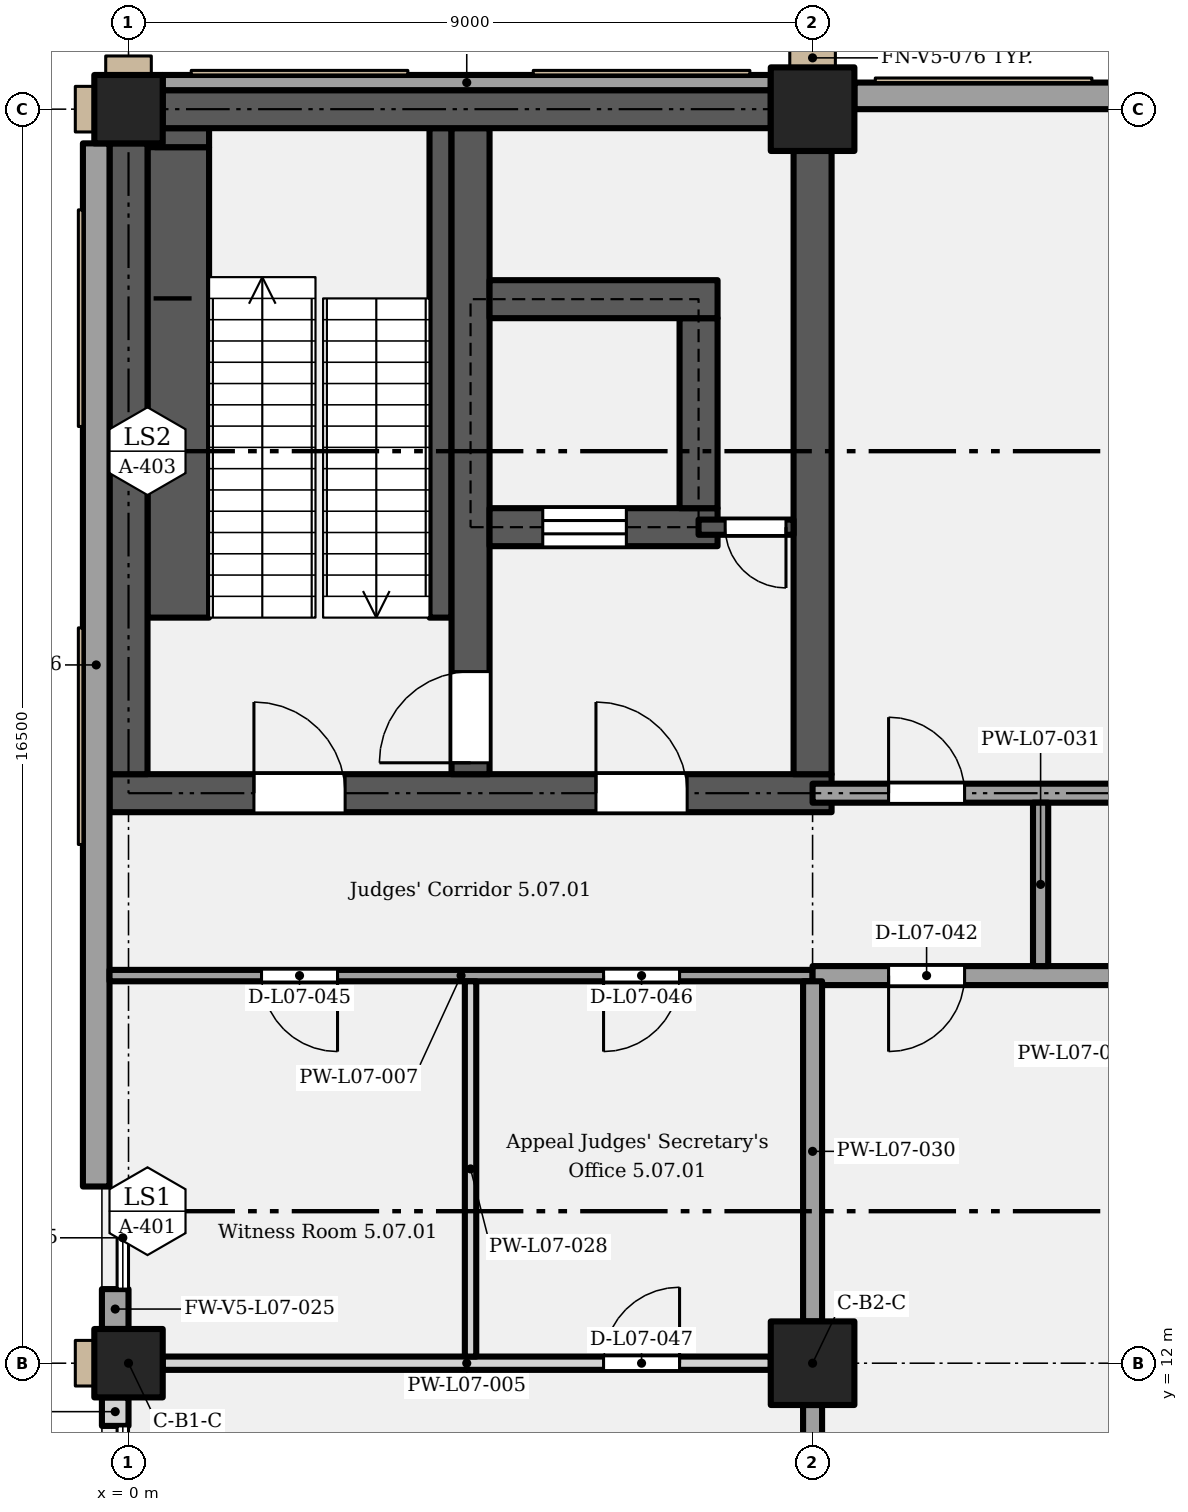
"""IFC4 building model, lengths in metres.
Left out: names, types, materials, properties, quantities, classifications, styles, units other than length and angle.
Written with IfcOpenShell. Run it as: python <this file> out.ifc"""

import sys

from ifc_helpers import new_model, si_unit, direction, frame, frame_2d, origin, origin_2d, place, context, subcontext, project, spatial, rectangle, extrude, element, fill, save


model = new_model("IFC4")
c1 = context("Model", 3, precision=1e-05, world=origin(), true_north=direction((0.0, 1.0)))
c2 = subcontext(c1, "Body", "Model", "MODEL_VIEW")
j1 = project(units=[si_unit("LENGTHUNIT", "METRE"), si_unit("PLANEANGLEUNIT", "RADIAN")], contexts=[c1])
p1 = place(None, origin())
s1 = spatial("IfcSite", under=j1, at=p1, CompositionType="ELEMENT")
p2 = place(p1, origin())
s2 = spatial("IfcBuilding", under=s1, at=p2, CompositionType="ELEMENT")
p3 = place(p2, frame((0.0, 0.0, 39.0)))
s3 = spatial("IfcBuildingStorey", under=s2, at=p3, CompositionType="ELEMENT", Elevation=39.0)
p4 = place(p3, frame((0.0, 12.0, 0.0), z_axis=(0.0, 0.0, 1.0), x_axis=(1.0, 0.0, 0.0)))
e1 = element("IfcColumn", 1, at=p4, inside=s3, PredefinedType="COLUMN", context=c2, shape_type="SweptSolid", body=[
    extrude(rectangle(XDim=0.9, YDim=0.9, at=origin_2d()), origin(), (0.0, 0.0, 1.0), 5.4),
])
p5 = place(p3, frame((9.0, 12.0, 0.0), z_axis=(0.0, 0.0, 1.0), x_axis=(1.0, 0.0, 0.0)))
e2 = element("IfcColumn", 2, at=p5, inside=s3, PredefinedType="COLUMN", context=c2, shape_type="SweptSolid", body=[
    extrude(rectangle(XDim=1.1, YDim=1.1, at=origin_2d()), origin(), (0.0, 0.0, 1.0), 5.4),
])
p6 = place(p3, frame((0.0, 28.5, 0.0), z_axis=(0.0, 0.0, 1.0), x_axis=(1.0, 0.0, 0.0)))
e3 = element("IfcColumn", 3, at=p6, inside=s3, PredefinedType="COLUMN", context=c2, shape_type="SweptSolid", body=[
    extrude(rectangle(XDim=0.9, YDim=0.9, at=origin_2d()), origin(), (0.0, 0.0, 1.0), 5.4),
])
p7 = place(p3, frame((9.0, 28.5, 0.0), z_axis=(0.0, 0.0, 1.0), x_axis=(1.0, 0.0, 0.0)))
e4 = element("IfcColumn", 4, at=p7, inside=s3, PredefinedType="COLUMN", context=c2, shape_type="SweptSolid", body=[
    extrude(rectangle(XDim=1.1, YDim=1.1, at=origin_2d()), origin(), (0.0, 0.0, 1.0), 5.4),
])
p8 = place(p3, frame((-0.25, 19.5, 0.0), z_axis=(0.0, 0.0, 1.0), x_axis=(1.0, 0.0, 0.0)))
e5 = element("IfcWall", 5, at=p8, inside=s3, PredefinedType="SHEAR", context=c2, shape_type="SweptSolid", body=[
    extrude(rectangle(XDim=9.5, YDim=0.5, at=frame_2d((4.75, 0.0))), origin(), (0.0, 0.0, 1.0), 5.15),
])
p9 = place(p8, frame((1.9, 0.0, 0.0)))
e6 = element("IfcOpeningElement", 6, at=p9, cuts=e5, PredefinedType="OPENING", context=c2, shape_type="SweptSolid", body=[
    extrude(rectangle(XDim=1.2, YDim=2.1, at=frame_2d((0.6, 1.05))), frame((0.0, 0.26, 0.0), z_axis=(0.0, -1.0, 0.0), x_axis=(1.0, 0.0, 0.0)), (0.0, 0.0, 1.0), 0.52),
])
p10 = place(p8, frame((6.4, 0.0, 0.0)))
e7 = element("IfcOpeningElement", 7, at=p10, cuts=e5, PredefinedType="OPENING", context=c2, shape_type="SweptSolid", body=[
    extrude(rectangle(XDim=1.2, YDim=2.1, at=frame_2d((0.6, 1.05))), frame((0.0, 0.26, 0.0), z_axis=(0.0, -1.0, 0.0), x_axis=(1.0, 0.0, 0.0)), (0.0, 0.0, 1.0), 0.52),
])
p11 = place(p3, frame((0.0, 19.75, 0.0), z_axis=(0.0, 0.0, 1.0), x_axis=(0.0, 1.0, 0.0)))
e8 = element("IfcWall", 8, at=p11, inside=s3, PredefinedType="SHEAR", context=c2, shape_type="SweptSolid", body=[
    extrude(rectangle(XDim=8.3, YDim=0.5, at=frame_2d((4.15, 0.0))), origin(), (0.0, 0.0, 1.0), 5.15),
])
p12 = place(p3, frame((4.5, 19.75, 0.0), z_axis=(0.0, 0.0, 1.0), x_axis=(0.0, 1.0, 0.0)))
e9 = element("IfcWall", 9, at=p12, inside=s3, PredefinedType="SHEAR", context=c2, shape_type="SweptSolid", body=[
    extrude(rectangle(XDim=8.5, YDim=0.5, at=frame_2d((4.25, 0.0))), origin(), (0.0, 0.0, 1.0), 5.15),
])
p13 = place(p12, frame((0.15, 0.0, 0.0)))
e10 = element("IfcOpeningElement", 10, at=p13, cuts=e9, PredefinedType="OPENING", context=c2, shape_type="SweptSolid", body=[
    extrude(rectangle(XDim=1.2, YDim=2.1, at=frame_2d((0.6, 1.05))), frame((0.0, 0.26, 0.0), z_axis=(0.0, -1.0, 0.0), x_axis=(1.0, 0.0, 0.0)), (0.0, 0.0, 1.0), 0.52),
])
p14 = place(p3, frame((9.0, 19.75, 0.0), z_axis=(0.0, 0.0, 1.0), x_axis=(0.0, 1.0, 0.0)))
e11 = element("IfcWall", 11, at=p14, inside=s3, PredefinedType="SHEAR", context=c2, shape_type="SweptSolid", body=[
    extrude(rectangle(XDim=8.2, YDim=0.5, at=frame_2d((4.1, 0.0))), origin(), (0.0, 0.0, 1.0), 5.15),
])
p15 = place(p3, frame((4.75, 23.0, 0.0), z_axis=(0.0, 0.0, 1.0), x_axis=(1.0, 0.0, 0.0)))
e12 = element("IfcWall", 12, at=p15, inside=s3, PredefinedType="SHEAR", context=c2, shape_type="SweptSolid", body=[
    extrude(rectangle(XDim=3.0, YDim=0.5, at=frame_2d((1.5, 0.0))), origin(), (0.0, 0.0, 1.0), 5.15),
])
p16 = place(p15, frame((0.7, 0.0, 0.0)))
e13 = element("IfcOpeningElement", 13, at=p16, cuts=e12, PredefinedType="OPENING", context=c2, shape_type="SweptSolid", body=[
    extrude(rectangle(XDim=1.1, YDim=2.1, at=frame_2d((0.55, 1.05))), frame((0.0, 0.26, 0.0), z_axis=(0.0, -1.0, 0.0), x_axis=(1.0, 0.0, 0.0)), (0.0, 0.0, 1.0), 0.52),
])
p17 = place(p3, frame((7.5, 23.25, 0.0), z_axis=(0.0, 0.0, 1.0), x_axis=(0.0, 1.0, 0.0)))
e14 = element("IfcWall", 14, at=p17, inside=s3, PredefinedType="SHEAR", context=c2, shape_type="SweptSolid", body=[
    extrude(rectangle(XDim=2.5, YDim=0.5, at=frame_2d((1.25, 0.0))), origin(), (0.0, 0.0, 1.0), 5.15),
])
p18 = place(p3, frame((4.75, 26.0, 0.0), z_axis=(0.0, 0.0, 1.0), x_axis=(1.0, 0.0, 0.0)))
e15 = element("IfcWall", 15, at=p18, inside=s3, PredefinedType="SHEAR", context=c2, shape_type="SweptSolid", body=[
    extrude(rectangle(XDim=3.0, YDim=0.5, at=frame_2d((1.5, 0.0))), origin(), (0.0, 0.0, 1.0), 5.15),
])
p19 = place(p3, frame((0.45, 28.5, 0.0), z_axis=(0.0, 0.0, 1.0), x_axis=(1.0, 0.0, 0.0)))
e16 = element("IfcWall", 16, at=p19, inside=s3, PredefinedType="SHEAR", context=c2, shape_type="SweptSolid", body=[
    extrude(rectangle(XDim=8.0, YDim=0.5, at=frame_2d((4.0, 0.0))), origin(), (0.0, 0.0, 1.0), 5.15),
])
p20 = place(p3, frame((0.45, 28.85, 0.0), z_axis=(0.0, 0.0, 1.0), x_axis=(1.0, 0.0, 0.0)))
e17 = element("IfcWall", 17, at=p20, inside=s3, PredefinedType="SOLIDWALL", context=c2, shape_type="SweptSolid", body=[
    extrude(rectangle(XDim=8.0, YDim=0.2, at=frame_2d((4.0, 0.0))), origin(), (0.0, 0.0, 1.0), 5.15),
])
p21 = place(p3, frame((9.55, 28.675, 0.0), z_axis=(0.0, 0.0, 1.0), x_axis=(1.0, 0.0, 0.0)))
e18 = element("IfcWall", 18, at=p21, inside=s3, PredefinedType="SOLIDWALL", context=c2, shape_type="SweptSolid", body=[
    extrude(rectangle(XDim=7.9, YDim=0.35, at=frame_2d((3.95, 0.0))), origin(), (0.0, 0.0, 1.0), 5.15),
])
p22 = place(p3, frame((-0.175, 11.175, 0.0), z_axis=(0.0, 0.0, 1.0), x_axis=(0.0, 1.0, 0.0)))
e19 = element("IfcWall", 19, at=p22, inside=s3, PredefinedType="SOLIDWALL", context=c2, shape_type="SweptSolid", body=[
    extrude(rectangle(XDim=0.375, YDim=0.35, at=frame_2d((0.188, 0.0))), origin(), (0.0, 0.0, 1.0), 5.15),
])
p23 = place(p3, frame((-0.175, 12.45, 0.0), z_axis=(0.0, 0.0, 1.0), x_axis=(0.0, 1.0, 0.0)))
e20 = element("IfcWall", 20, at=p23, inside=s3, PredefinedType="SOLIDWALL", context=c2, shape_type="SweptSolid", body=[
    extrude(rectangle(XDim=0.525, YDim=0.35, at=frame_2d((0.263, 0.0))), origin(), (0.0, 0.0, 1.0), 5.15),
])
p24 = place(p3, frame((-0.425, 14.325, 0.0), z_axis=(0.0, 0.0, 1.0), x_axis=(0.0, 1.0, 0.0)))
e21 = element("IfcWall", 21, at=p24, inside=s3, PredefinedType="SOLIDWALL", context=c2, shape_type="SweptSolid", body=[
    extrude(rectangle(XDim=13.725, YDim=0.35, at=frame_2d((6.863, 0.0))), origin(), (0.0, 0.0, 1.0), 5.15),
])
p25 = place(p3, frame((0.45, 12.0, 0.0), z_axis=(0.0, 0.0, 1.0), x_axis=(1.0, 0.0, 0.0)))
e22 = element("IfcWall", 22, at=p25, inside=s3, PredefinedType="PARTITIONING", context=c2, shape_type="SweptSolid", body=[
    extrude(rectangle(XDim=8.0, YDim=0.175, at=frame_2d((4.0, 0.0))), origin(), (0.0, 0.0, 1.0), 4.4),
])
p26 = place(p25, frame((5.8, 0.0, 0.0)))
e23 = element("IfcOpeningElement", 23, at=p26, cuts=e22, PredefinedType="OPENING", context=c2, shape_type="SweptSolid", body=[
    extrude(rectangle(XDim=1.0, YDim=2.1, at=frame_2d((0.5, 1.05))), frame((0.0, 0.097, 0.0), z_axis=(0.0, -1.0, 0.0), x_axis=(1.0, 0.0, 0.0)), (0.0, 0.0, 1.0), 0.195),
])
p27 = place(p3, frame((-0.25, 17.1, 0.0), z_axis=(0.0, 0.0, 1.0), x_axis=(1.0, 0.0, 0.0)))
e24 = element("IfcWall", 24, at=p27, inside=s3, PredefinedType="PARTITIONING", context=c2, shape_type="SweptSolid", body=[
    extrude(rectangle(XDim=9.25, YDim=0.15, at=frame_2d((4.625, 0.0))), origin(), (0.0, 0.0, 1.0), 5.15),
])
p28 = place(p27, frame((3.0, 0.0, 0.0), z_axis=(0.0, 0.0, 1.0), x_axis=(-1.0, 0.0, 0.0)))
e25 = element("IfcOpeningElement", 25, at=p28, cuts=e24, PredefinedType="OPENING", context=c2, shape_type="SweptSolid", body=[
    extrude(rectangle(XDim=1.0, YDim=2.1, at=frame_2d((0.5, 1.05))), frame((0.0, 0.085, 0.0), z_axis=(0.0, -1.0, 0.0), x_axis=(1.0, 0.0, 0.0)), (0.0, 0.0, 1.0), 0.17),
])
p29 = place(p27, frame((7.5, 0.0, 0.0), z_axis=(0.0, 0.0, 1.0), x_axis=(-1.0, 0.0, 0.0)))
e26 = element("IfcOpeningElement", 26, at=p29, cuts=e24, PredefinedType="OPENING", context=c2, shape_type="SweptSolid", body=[
    extrude(rectangle(XDim=1.0, YDim=2.1, at=frame_2d((0.5, 1.05))), frame((0.0, 0.085, 0.0), z_axis=(0.0, -1.0, 0.0), x_axis=(1.0, 0.0, 0.0)), (0.0, 0.0, 1.0), 0.17),
])
p30 = place(p3, frame((9.0, 17.1, 0.0), z_axis=(0.0, 0.0, 1.0), x_axis=(1.0, 0.0, 0.0)))
e27 = element("IfcWall", 27, at=p30, inside=s3, PredefinedType="PARTITIONING", context=c2, shape_type="SweptSolid", body=[
    extrude(rectangle(XDim=9.0, YDim=0.25, at=frame_2d((4.5, 0.0))), origin(), (0.0, 0.0, 1.0), 5.15),
])
p31 = place(p30, frame((6.9, 0.0, 0.0), z_axis=(0.0, 0.0, 1.0), x_axis=(-1.0, 0.0, 0.0)))
e28 = element("IfcOpeningElement", 28, at=p31, cuts=e27, PredefinedType="OPENING", context=c2, shape_type="SweptSolid", body=[
    extrude(rectangle(XDim=1.8, YDim=2.4, at=frame_2d((0.9, 1.2))), frame((0.0, 0.135, 0.0), z_axis=(0.0, -1.0, 0.0), x_axis=(1.0, 0.0, 0.0)), (0.0, 0.0, 1.0), 0.27),
])
p32 = place(p30, frame((2.0, 0.0, 0.0), z_axis=(0.0, 0.0, 1.0), x_axis=(-1.0, 0.0, 0.0)))
e29 = element("IfcOpeningElement", 29, at=p32, cuts=e27, PredefinedType="OPENING", context=c2, shape_type="SweptSolid", body=[
    extrude(rectangle(XDim=1.0, YDim=2.1, at=frame_2d((0.5, 1.05))), frame((0.0, 0.135, 0.0), z_axis=(0.0, -1.0, 0.0), x_axis=(1.0, 0.0, 0.0)), (0.0, 0.0, 1.0), 0.27),
])
p33 = place(p3, frame((9.0, 19.5, 0.0), z_axis=(0.0, 0.0, 1.0), x_axis=(1.0, 0.0, 0.0)))
e30 = element("IfcWall", 30, at=p33, inside=s3, PredefinedType="PARTITIONING", context=c2, shape_type="SweptSolid", body=[
    extrude(rectangle(XDim=9.0, YDim=0.25, at=frame_2d((4.5, 0.0))), origin(), (0.0, 0.0, 1.0), 5.15),
])
p34 = place(p33, frame((5.1, 0.0, 0.0)))
e31 = element("IfcOpeningElement", 31, at=p34, cuts=e30, PredefinedType="OPENING", context=c2, shape_type="SweptSolid", body=[
    extrude(rectangle(XDim=1.8, YDim=2.4, at=frame_2d((0.9, 1.2))), frame((0.0, 0.135, 0.0), z_axis=(0.0, -1.0, 0.0), x_axis=(1.0, 0.0, 0.0)), (0.0, 0.0, 1.0), 0.27),
])
p35 = place(p33, frame((1.0, 0.0, 0.0)))
e32 = element("IfcOpeningElement", 32, at=p35, cuts=e30, PredefinedType="OPENING", context=c2, shape_type="SweptSolid", body=[
    extrude(rectangle(XDim=1.0, YDim=2.1, at=frame_2d((0.5, 1.05))), frame((0.0, 0.135, 0.0), z_axis=(0.0, -1.0, 0.0), x_axis=(1.0, 0.0, 0.0)), (0.0, 0.0, 1.0), 0.27),
])
p36 = place(p3, frame((7.5, 23.0, 0.0), z_axis=(0.0, 0.0, 1.0), x_axis=(1.0, 0.0, 0.0)))
e33 = element("IfcWall", 33, at=p36, inside=s3, PredefinedType="SHEAR", context=c2, shape_type="SweptSolid", body=[
    extrude(rectangle(XDim=1.25, YDim=0.2, at=frame_2d((0.625, 0.0))), origin(), (0.0, 0.0, 1.0), 5.15),
])
p37 = place(p36, frame((1.15, 0.0, 0.0), z_axis=(0.0, 0.0, 1.0), x_axis=(-1.0, 0.0, 0.0)))
e34 = element("IfcOpeningElement", 34, at=p37, cuts=e33, PredefinedType="OPENING", context=c2, shape_type="SweptSolid", body=[
    extrude(rectangle(XDim=0.8, YDim=2.0, at=frame_2d((0.4, 1.0))), frame((0.0, 0.11, 0.0), z_axis=(0.0, -1.0, 0.0), x_axis=(1.0, 0.0, 0.0)), (0.0, 0.0, 1.0), 0.22),
])
p38 = place(p3, frame((4.5, 12.087, 0.0), z_axis=(0.0, 0.0, 1.0), x_axis=(0.0, 1.0, 0.0)))
e35 = element("IfcWall", 35, at=p38, inside=s3, PredefinedType="PARTITIONING", context=c2, shape_type="SweptSolid", body=[
    extrude(rectangle(XDim=4.938, YDim=0.15, at=frame_2d((2.469, 0.0))), origin(), (0.0, 0.0, 1.0), 5.15),
])
p39 = place(p3, frame((9.0, 0.55, 0.0), z_axis=(0.0, 0.0, 1.0), x_axis=(0.0, 1.0, 0.0)))
e36 = element("IfcWall", 36, at=p39, inside=s3, PredefinedType="PARTITIONING", context=c2, shape_type="SweptSolid", body=[
    extrude(rectangle(XDim=10.9, YDim=0.25, at=frame_2d((5.45, 0.0))), origin(), (0.0, 0.0, 1.0), 4.4),
])
p40 = place(p39, frame((5.95, 0.0, 0.0), z_axis=(0.0, 0.0, 1.0), x_axis=(-1.0, 0.0, 0.0)))
e37 = element("IfcOpeningElement", 37, at=p40, cuts=e36, PredefinedType="OPENING", context=c2, shape_type="SweptSolid", body=[
    extrude(rectangle(XDim=1.0, YDim=2.1, at=frame_2d((0.5, 1.05))), frame((0.0, 0.135, 0.0), z_axis=(0.0, -1.0, 0.0), x_axis=(1.0, 0.0, 0.0)), (0.0, 0.0, 1.0), 0.27),
])
p41 = place(p3, frame((9.0, 12.55, 0.0), z_axis=(0.0, 0.0, 1.0), x_axis=(0.0, 1.0, 0.0)))
e38 = element("IfcWall", 38, at=p41, inside=s3, PredefinedType="PARTITIONING", context=c2, shape_type="SweptSolid", body=[
    extrude(rectangle(XDim=4.475, YDim=0.25, at=frame_2d((2.237, 0.0))), origin(), (0.0, 0.0, 1.0), 4.2),
])
p42 = place(p3, frame((12.0, 17.225, 0.0), z_axis=(0.0, 0.0, 1.0), x_axis=(0.0, 1.0, 0.0)))
e39 = element("IfcWall", 39, at=p42, inside=s3, PredefinedType="PARTITIONING", context=c2, shape_type="SweptSolid", body=[
    extrude(rectangle(XDim=2.15, YDim=0.2, at=frame_2d((1.075, 0.0))), origin(), (0.0, 0.0, 1.0), 5.15),
])
p43 = place(p3, frame((0.655, 21.81, 0.0), z_axis=(0.0, 0.0, 1.0), x_axis=(0.0, 1.0, 0.0)))
e40 = element("IfcWall", 40, at=p43, inside=s3, PredefinedType="SHEAR", context=c2, shape_type="SweptSolid", body=[
    extrude(rectangle(XDim=6.19, YDim=0.81, at=frame_2d((3.095, 0.0))), origin(), (0.0, 0.0, 1.0), 2.587),
])
p44 = place(p3, frame((0.705, 28.0, 0.0), z_axis=(0.0, 0.0, 1.0), x_axis=(0.0, 1.0, 0.0)))
e41 = element("IfcWall", 41, at=p44, inside=s3, PredefinedType="SHEAR", context=c2, shape_type="SweptSolid", body=[
    extrude(rectangle(XDim=0.25, YDim=0.71, at=frame_2d((0.125, 0.0))), origin(), (0.0, 0.0, 1.0), 2.587),
])
p45 = place(p3, frame((4.105, 21.81, 0.0), z_axis=(0.0, 0.0, 1.0), x_axis=(0.0, 1.0, 0.0)))
e42 = element("IfcWall", 42, at=p45, inside=s3, PredefinedType="SHEAR", context=c2, shape_type="SweptSolid", body=[
    extrude(rectangle(XDim=6.44, YDim=0.29, at=frame_2d((3.22, 0.0))), origin(), (0.0, 0.0, 1.0), 2.587),
])
p46 = place(p9, origin())
e43 = element("IfcDoor", 43, at=p46, inside=s3, OperationType="SINGLE_SWING_LEFT", PredefinedType="DOOR", context=c2, shape_type="SweptSolid", body=[
    extrude(rectangle(XDim=1.2, YDim=2.1, at=frame_2d((0.6, 1.05))), frame((0.0, 0.025, 0.0), z_axis=(0.0, -1.0, 0.0), x_axis=(1.0, 0.0, 0.0)), (0.0, 0.0, 1.0), 0.05),
])
fill(e6, e43)
p47 = place(p13, origin())
e44 = element("IfcDoor", 44, at=p47, inside=s3, OperationType="SINGLE_SWING_LEFT", PredefinedType="DOOR", context=c2, shape_type="SweptSolid", body=[
    extrude(rectangle(XDim=1.2, YDim=2.1, at=frame_2d((0.6, 1.05))), frame((0.0, 0.025, 0.0), z_axis=(0.0, -1.0, 0.0), x_axis=(1.0, 0.0, 0.0)), (0.0, 0.0, 1.0), 0.05),
])
fill(e10, e44)
p48 = place(p10, origin())
e45 = element("IfcDoor", 45, at=p48, inside=s3, OperationType="SINGLE_SWING_LEFT", PredefinedType="DOOR", context=c2, shape_type="SweptSolid", body=[
    extrude(rectangle(XDim=1.2, YDim=2.1, at=frame_2d((0.6, 1.05))), frame((0.0, 0.025, 0.0), z_axis=(0.0, -1.0, 0.0), x_axis=(1.0, 0.0, 0.0)), (0.0, 0.0, 1.0), 0.05),
])
fill(e7, e45)
p49 = place(p16, origin())
e46 = element("IfcDoor", 46, at=p49, inside=s3, OperationType="SLIDING_TO_LEFT", PredefinedType="DOOR", context=c2, shape_type="SweptSolid", body=[
    extrude(rectangle(XDim=1.1, YDim=2.1, at=frame_2d((0.55, 1.05))), frame((0.0, 0.025, 0.0), z_axis=(0.0, -1.0, 0.0), x_axis=(1.0, 0.0, 0.0)), (0.0, 0.0, 1.0), 0.05),
])
fill(e13, e46)
p50 = place(p37, origin())
e47 = element("IfcDoor", 47, at=p50, inside=s3, OperationType="SINGLE_SWING_LEFT", PredefinedType="DOOR", context=c2, shape_type="SweptSolid", body=[
    extrude(rectangle(XDim=0.8, YDim=2.0, at=frame_2d((0.4, 1.0))), frame((0.0, 0.025, 0.0), z_axis=(0.0, -1.0, 0.0), x_axis=(1.0, 0.0, 0.0)), (0.0, 0.0, 1.0), 0.05),
])
fill(e34, e47)
p51 = place(p32, origin())
e48 = element("IfcDoor", 48, at=p51, inside=s3, OperationType="SINGLE_SWING_RIGHT", PredefinedType="DOOR", context=c2, shape_type="SweptSolid", body=[
    extrude(rectangle(XDim=1.0, YDim=2.1, at=frame_2d((0.5, 1.05))), frame((0.0, 0.025, 0.0), z_axis=(0.0, -1.0, 0.0), x_axis=(1.0, 0.0, 0.0)), (0.0, 0.0, 1.0), 0.05),
])
fill(e29, e48)
p52 = place(p35, origin())
e49 = element("IfcDoor", 49, at=p52, inside=s3, OperationType="SINGLE_SWING_LEFT", PredefinedType="DOOR", context=c2, shape_type="SweptSolid", body=[
    extrude(rectangle(XDim=1.0, YDim=2.1, at=frame_2d((0.5, 1.05))), frame((0.0, 0.025, 0.0), z_axis=(0.0, -1.0, 0.0), x_axis=(1.0, 0.0, 0.0)), (0.0, 0.0, 1.0), 0.05),
])
fill(e32, e49)
p53 = place(p28, origin())
e50 = element("IfcDoor", 50, at=p53, inside=s3, OperationType="SINGLE_SWING_LEFT", PredefinedType="DOOR", context=c2, shape_type="SweptSolid", body=[
    extrude(rectangle(XDim=1.0, YDim=2.1, at=frame_2d((0.5, 1.05))), frame((0.0, 0.025, 0.0), z_axis=(0.0, -1.0, 0.0), x_axis=(1.0, 0.0, 0.0)), (0.0, 0.0, 1.0), 0.05),
])
fill(e25, e50)
p54 = place(p29, origin())
e51 = element("IfcDoor", 51, at=p54, inside=s3, OperationType="SINGLE_SWING_RIGHT", PredefinedType="DOOR", context=c2, shape_type="SweptSolid", body=[
    extrude(rectangle(XDim=1.0, YDim=2.1, at=frame_2d((0.5, 1.05))), frame((0.0, 0.025, 0.0), z_axis=(0.0, -1.0, 0.0), x_axis=(1.0, 0.0, 0.0)), (0.0, 0.0, 1.0), 0.05),
])
fill(e26, e51)
p55 = place(p26, origin())
e52 = element("IfcDoor", 52, at=p55, inside=s3, OperationType="SINGLE_SWING_RIGHT", PredefinedType="DOOR", context=c2, shape_type="SweptSolid", body=[
    extrude(rectangle(XDim=1.0, YDim=2.1, at=frame_2d((0.5, 1.05))), frame((0.0, 0.025, 0.0), z_axis=(0.0, -1.0, 0.0), x_axis=(1.0, 0.0, 0.0)), (0.0, 0.0, 1.0), 0.05),
])
fill(e23, e52)
save(model, sys.argv[1])
